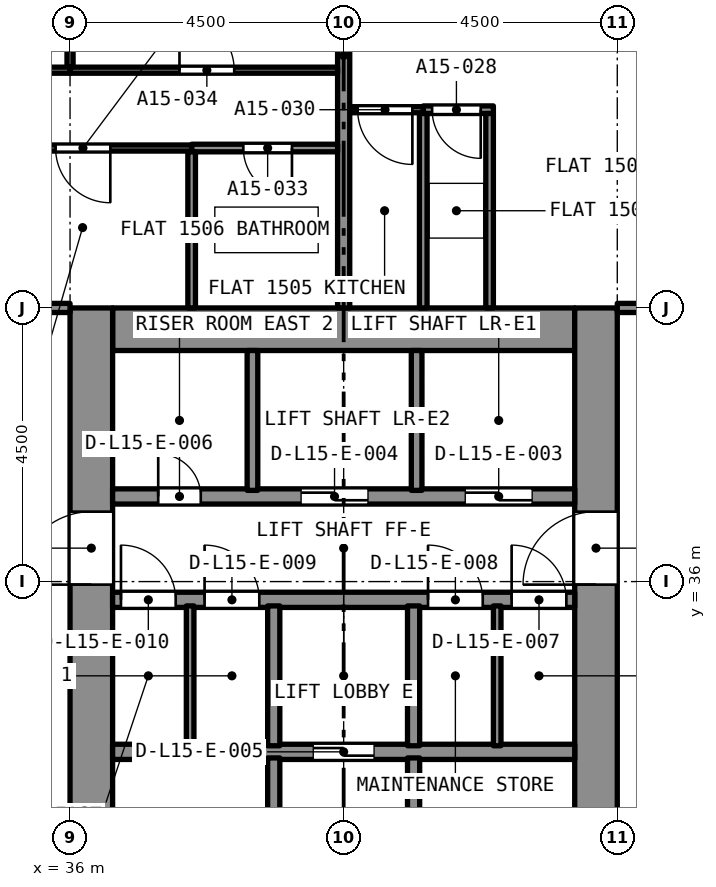
"""IFC4 building model, lengths in metres.
Left out: names, types, materials, properties, quantities, classifications, styles, units other than length and angle.
Written with IfcOpenShell. Run it as: python <this file> out.ifc"""

import sys

from ifc_helpers import new_model, si_unit, direction, frame, frame_2d, origin, place, context, subcontext, project, spatial, rectangle, extrude, element, fill, save


model = new_model("IFC4")
c1 = context("Model", 3, precision=1e-05, world=origin(), true_north=direction((0.0, 1.0)))
c2 = subcontext(c1, "Body", "Model", "MODEL_VIEW")
j1 = project(units=[si_unit("LENGTHUNIT", "METRE"), si_unit("PLANEANGLEUNIT", "RADIAN")], contexts=[c1])
p1 = place(None, origin())
s1 = spatial("IfcSite", under=j1, at=p1, CompositionType="ELEMENT")
p2 = place(p1, origin())
s2 = spatial("IfcBuilding", under=s1, at=p2, CompositionType="ELEMENT")
p3 = place(p2, frame((0.0, 0.0, 59.2)))
s3 = spatial("IfcBuildingStorey", under=s2, at=p3, CompositionType="ELEMENT", Elevation=59.2)
p4 = place(p3, frame((36.7, 40.15, 0.0), z_axis=(0.0, 0.0, 1.0), x_axis=(1.0, 0.0, 0.0)))
e1 = element("IfcWall", 1, at=p4, inside=s3, PredefinedType="SOLIDWALL", context=c2, shape_type="SweptSolid", body=[
    extrude(rectangle(XDim=7.6, YDim=0.7, at=frame_2d((3.8, 0.0))), origin(), (0.0, 0.0, 1.0), 3.2),
])
p5 = place(p3, frame((36.35, 27.0, 0.0), z_axis=(0.0, 0.0, 1.0), x_axis=(0.0, 1.0, 0.0)))
e2 = element("IfcWall", 2, at=p5, inside=s3, PredefinedType="SOLIDWALL", context=c2, shape_type="SweptSolid", body=[
    extrude(rectangle(XDim=13.5, YDim=0.7, at=frame_2d((6.75, 0.0))), origin(), (0.0, 0.0, 1.0), 3.2),
])
p6 = place(p5, frame((8.95, 0.0, 0.0)))
e3 = element("IfcOpeningElement", 3, at=p6, cuts=e2, PredefinedType="OPENING", context=c2, shape_type="SweptSolid", body=[
    extrude(rectangle(XDim=1.2, YDim=2.1, at=frame_2d((0.6, 1.05))), frame((0.0, 0.36, 0.0), z_axis=(0.0, -1.0, 0.0), x_axis=(1.0, 0.0, 0.0)), (0.0, 0.0, 1.0), 0.72),
])
p7 = place(p3, frame((44.65, 27.0, 0.0), z_axis=(0.0, 0.0, 1.0), x_axis=(0.0, 1.0, 0.0)))
e4 = element("IfcWall", 4, at=p7, inside=s3, PredefinedType="SOLIDWALL", context=c2, shape_type="SweptSolid", body=[
    extrude(rectangle(XDim=13.5, YDim=0.7, at=frame_2d((6.75, 0.0))), origin(), (0.0, 0.0, 1.0), 3.2),
])
p8 = place(p7, frame((8.95, 0.0, 0.0)))
e5 = element("IfcOpeningElement", 5, at=p8, cuts=e4, PredefinedType="OPENING", context=c2, shape_type="SweptSolid", body=[
    extrude(rectangle(XDim=1.2, YDim=2.1, at=frame_2d((0.6, 1.05))), frame((0.0, 0.36, 0.0), z_axis=(0.0, -1.0, 0.0), x_axis=(1.0, 0.0, 0.0)), (0.0, 0.0, 1.0), 0.72),
])
p9 = place(p3, frame((42.962, 43.76, 0.0), z_axis=(0.0, 0.0, 1.0), x_axis=(-1.0, 0.0, 0.0)))
e6 = element("IfcWall", 6, at=p9, inside=s3, PredefinedType="PARTITIONING", context=c2, shape_type="SweptSolid", body=[
    extrude(rectangle(XDim=1.153, YDim=0.125, at=frame_2d((0.577, 0.0))), origin(), (0.0, 0.0, 1.0), 2.9),
])
p10 = place(p9, frame((0.208, 0.0, 0.0)))
e7 = element("IfcOpeningElement", 7, at=p10, cuts=e6, PredefinedType="OPENING", context=c2, shape_type="SweptSolid", body=[
    extrude(rectangle(XDim=0.8, YDim=2.1, at=frame_2d((0.4, 1.05))), frame((0.0, 0.073, 0.0), z_axis=(0.0, -1.0, 0.0), x_axis=(1.0, 0.0, 0.0)), (0.0, 0.0, 1.0), 0.145),
])
for number, where, z_axis, x_axis in (
    (8, (42.9, 40.5, 0.0), (0.0, 0.0, 1.0), (0.0, 1.0, 0.0)),
    (9, (41.809, 40.5, 0.0), (0.0, 0.0, 1.0), (0.0, 1.0, 0.0)),
):
    element("IfcWall", number, at=place(p3, frame(where, z_axis=z_axis, x_axis=x_axis)), inside=s3, PredefinedType="PARTITIONING", context=c2, shape_type="SweptSolid", body=[
        extrude(rectangle(XDim=3.198, YDim=0.125, at=frame_2d((1.599, 0.0))), origin(), (0.0, 0.0, 1.0), 2.9),
    ])
p11 = place(p3, frame((41.809, 43.76, 0.0), z_axis=(0.0, 0.0, 1.0), x_axis=(-1.0, 0.0, 0.0)))
e10 = element("IfcWall", 10, at=p11, inside=s3, PredefinedType="PARTITIONING", context=c2, shape_type="SweptSolid", body=[
    extrude(rectangle(XDim=1.209, YDim=0.1, at=frame_2d((0.604, 0.0))), origin(), (0.0, 0.0, 1.0), 2.9),
])
p12 = place(p11, frame((0.179, 0.0, 0.0)))
e11 = element("IfcOpeningElement", 11, at=p12, cuts=e10, PredefinedType="OPENING", context=c2, shape_type="SweptSolid", body=[
    extrude(rectangle(XDim=0.9, YDim=2.1, at=frame_2d((0.45, 1.05))), frame((0.0, 0.06, 0.0), z_axis=(0.0, -1.0, 0.0), x_axis=(1.0, 0.0, 0.0)), (0.0, 0.0, 1.0), 0.12),
])
p13 = place(p3, frame((45.0, 40.5, 0.0), z_axis=(0.0, 0.0, 1.0), x_axis=(1.0, 0.0, 0.0)))
e12 = element("IfcWall", 12, at=p13, inside=s3, PredefinedType="PARTITIONING", context=c2, shape_type="SweptSolid", body=[
    extrude(rectangle(XDim=3.8, YDim=0.15, at=frame_2d((1.9, 0.0))), origin(), (0.0, 0.0, 1.0), 2.9),
])
p14 = place(p13, frame((1.75, 0.0, 0.0)))
e13 = element("IfcOpeningElement", 13, at=p14, cuts=e12, PredefinedType="OPENING", context=c2, shape_type="SweptSolid", body=[
    extrude(rectangle(XDim=1.0, YDim=2.1, at=frame_2d((0.5, 1.05))), frame((0.0, 0.085, 0.0), z_axis=(0.0, -1.0, 0.0), x_axis=(1.0, 0.0, 0.0)), (0.0, 0.0, 1.0), 0.17),
])
p15 = place(p3, frame((40.5, 40.5, 0.0), z_axis=(0.0, 0.0, 1.0), x_axis=(0.0, 1.0, 0.0)))
e14 = element("IfcWall", 14, at=p15, inside=s3, PredefinedType="PARTITIONING", context=c2, shape_type="SweptSolid", body=[
    extrude(rectangle(XDim=8.3, YDim=0.2, at=frame_2d((4.15, 0.0))), origin(), (0.0, 0.0, 1.0), 2.9),
])
p16 = place(p3, frame((40.4, 43.13, 0.0), z_axis=(0.0, 0.0, 1.0), x_axis=(-1.0, 0.0, 0.0)))
e15 = element("IfcWall", 15, at=p16, inside=s3, PredefinedType="PARTITIONING", context=c2, shape_type="SweptSolid", body=[
    extrude(rectangle(XDim=2.4, YDim=0.125, at=frame_2d((1.2, 0.0))), origin(), (0.0, 0.0, 1.0), 2.9),
])
p17 = place(p16, frame((0.75, 0.0, 0.0)))
e16 = element("IfcOpeningElement", 16, at=p17, cuts=e15, PredefinedType="OPENING", context=c2, shape_type="SweptSolid", body=[
    extrude(rectangle(XDim=0.8, YDim=2.1, at=frame_2d((0.4, 1.05))), frame((0.0, 0.073, 0.0), z_axis=(0.0, -1.0, 0.0), x_axis=(1.0, 0.0, 0.0)), (0.0, 0.0, 1.0), 0.145),
])
p18 = place(p3, frame((38.0, 40.5, 0.0), z_axis=(0.0, 0.0, 1.0), x_axis=(0.0, 1.0, 0.0)))
e17 = element("IfcWall", 17, at=p18, inside=s3, PredefinedType="PARTITIONING", context=c2, shape_type="SweptSolid", body=[
    extrude(rectangle(XDim=2.567, YDim=0.125, at=frame_2d((1.284, 0.0))), origin(), (0.0, 0.0, 1.0), 2.9),
])
p19 = place(p3, frame((36.0, 44.41, 0.0), z_axis=(0.0, 0.0, 1.0), x_axis=(1.0, 0.0, 0.0)))
e18 = element("IfcWall", 18, at=p19, inside=s3, PredefinedType="PARTITIONING", context=c2, shape_type="SweptSolid", body=[
    extrude(rectangle(XDim=4.4, YDim=0.1, at=frame_2d((2.2, 0.0))), origin(), (0.0, 0.0, 1.0), 2.9),
])
p20 = place(p19, frame((1.8, 0.0, 0.0)))
e19 = element("IfcOpeningElement", 19, at=p20, cuts=e18, PredefinedType="OPENING", context=c2, shape_type="SweptSolid", body=[
    extrude(rectangle(XDim=0.9, YDim=2.1, at=frame_2d((0.45, 1.05))), frame((0.0, 0.06, 0.0), z_axis=(0.0, -1.0, 0.0), x_axis=(1.0, 0.0, 0.0)), (0.0, 0.0, 1.0), 0.12),
])
p21 = place(p3, frame((36.0, 44.46, 0.0), z_axis=(0.0, 0.0, 1.0), x_axis=(0.0, 1.0, 0.0)))
e20 = element("IfcWall", 20, at=p21, inside=s3, PredefinedType="PARTITIONING", context=c2, shape_type="SweptSolid", body=[
    extrude(rectangle(XDim=4.34, YDim=0.1, at=frame_2d((2.17, 0.0))), origin(), (0.0, 0.0, 1.0), 2.9),
])
p22 = place(p3, frame((38.0, 43.13, 0.0), z_axis=(0.0, 0.0, 1.0), x_axis=(-1.0, 0.0, 0.0)))
e21 = element("IfcWall", 21, at=p22, inside=s3, PredefinedType="PARTITIONING", context=c2, shape_type="SweptSolid", body=[
    extrude(rectangle(XDim=3.625, YDim=0.1, at=frame_2d((1.812, 0.0))), origin(), (0.0, 0.0, 1.0), 2.9),
])
p23 = place(p22, frame((1.337, 0.0, 0.0)))
e22 = element("IfcOpeningElement", 22, at=p23, cuts=e21, PredefinedType="OPENING", context=c2, shape_type="SweptSolid", body=[
    extrude(rectangle(XDim=0.9, YDim=2.1, at=frame_2d((0.45, 1.05))), frame((0.0, 0.06, 0.0), z_axis=(0.0, -1.0, 0.0), x_axis=(1.0, 0.0, 0.0)), (0.0, 0.0, 1.0), 0.12),
])
p24 = place(p3, frame((32.2, 44.41, 0.0), z_axis=(0.0, 0.0, 1.0), x_axis=(1.0, 0.0, 0.0)))
e23 = element("IfcWall", 23, at=p24, inside=s3, PredefinedType="PARTITIONING", context=c2, shape_type="SweptSolid", body=[
    extrude(rectangle(XDim=3.8, YDim=0.1, at=frame_2d((1.9, 0.0))), origin(), (0.0, 0.0, 1.0), 2.9),
])
p25 = place(p24, frame((1.05, 0.0, 0.0)))
e24 = element("IfcOpeningElement", 24, at=p25, cuts=e23, PredefinedType="OPENING", context=c2, shape_type="SweptSolid", body=[
    extrude(rectangle(XDim=1.0, YDim=2.1, at=frame_2d((0.5, 1.05))), frame((0.0, 0.06, 0.0), z_axis=(0.0, -1.0, 0.0), x_axis=(1.0, 0.0, 0.0)), (0.0, 0.0, 1.0), 0.12),
])
p26 = place(p3, frame((34.425, 40.5, 0.0), z_axis=(0.0, 0.0, 1.0), x_axis=(1.0, 0.0, 0.0)))
e25 = element("IfcWall", 25, at=p26, inside=s3, PredefinedType="PARTITIONING", context=c2, shape_type="SweptSolid", body=[
    extrude(rectangle(XDim=1.575, YDim=0.15, at=frame_2d((0.788, 0.0))), origin(), (0.0, 0.0, 1.0), 2.9),
])
p27 = place(p3, frame((36.7, 33.2, 0.0), z_axis=(0.0, 0.0, 1.0), x_axis=(1.0, 0.0, 0.0)))
e26 = element("IfcWall", 26, at=p27, inside=s3, PredefinedType="SOLIDWALL", context=c2, shape_type="SweptSolid", body=[
    extrude(rectangle(XDim=7.6, YDim=0.25, at=frame_2d((3.8, 0.0))), origin(), (0.0, 0.0, 1.0), 2.9),
])
p28 = place(p27, frame((3.3, 0.0, 0.0)))
e27 = element("IfcOpeningElement", 27, at=p28, cuts=e26, PredefinedType="OPENING", context=c2, shape_type="SweptSolid", body=[
    extrude(rectangle(XDim=1.0, YDim=2.1, at=frame_2d((0.5, 1.05))), frame((0.0, 0.135, 0.0), z_axis=(0.0, -1.0, 0.0), x_axis=(1.0, 0.0, 0.0)), (0.0, 0.0, 1.0), 0.27),
])
p29 = place(p3, frame((36.7, 35.7, 0.0), z_axis=(0.0, 0.0, 1.0), x_axis=(1.0, 0.0, 0.0)))
e28 = element("IfcWall", 28, at=p29, inside=s3, PredefinedType="SOLIDWALL", context=c2, shape_type="SweptSolid", body=[
    extrude(rectangle(XDim=7.6, YDim=0.25, at=frame_2d((3.8, 0.0))), origin(), (0.0, 0.0, 1.0), 2.9),
])
p30 = place(p29, frame((6.562, 0.0, 0.0)))
e29 = element("IfcOpeningElement", 29, at=p30, cuts=e28, PredefinedType="OPENING", context=c2, shape_type="SweptSolid", body=[
    extrude(rectangle(XDim=0.9, YDim=2.1, at=frame_2d((0.45, 1.05))), frame((0.0, 0.135, 0.0), z_axis=(0.0, -1.0, 0.0), x_axis=(1.0, 0.0, 0.0)), (0.0, 0.0, 1.0), 0.27),
])
p31 = place(p29, frame((5.188, 0.0, 0.0)))
e30 = element("IfcOpeningElement", 30, at=p31, cuts=e28, PredefinedType="OPENING", context=c2, shape_type="SweptSolid", body=[
    extrude(rectangle(XDim=0.9, YDim=2.1, at=frame_2d((0.45, 1.05))), frame((0.0, 0.135, 0.0), z_axis=(0.0, -1.0, 0.0), x_axis=(1.0, 0.0, 0.0)), (0.0, 0.0, 1.0), 0.27),
])
p32 = place(p29, frame((1.512, 0.0, 0.0)))
e31 = element("IfcOpeningElement", 31, at=p32, cuts=e28, PredefinedType="OPENING", context=c2, shape_type="SweptSolid", body=[
    extrude(rectangle(XDim=0.9, YDim=2.1, at=frame_2d((0.45, 1.05))), frame((0.0, 0.135, 0.0), z_axis=(0.0, -1.0, 0.0), x_axis=(1.0, 0.0, 0.0)), (0.0, 0.0, 1.0), 0.27),
])
p33 = place(p29, frame((0.137, 0.0, 0.0)))
e32 = element("IfcOpeningElement", 32, at=p33, cuts=e28, PredefinedType="OPENING", context=c2, shape_type="SweptSolid", body=[
    extrude(rectangle(XDim=0.9, YDim=2.1, at=frame_2d((0.45, 1.05))), frame((0.0, 0.135, 0.0), z_axis=(0.0, -1.0, 0.0), x_axis=(1.0, 0.0, 0.0)), (0.0, 0.0, 1.0), 0.27),
])
p34 = place(p3, frame((36.7, 37.4, 0.0), z_axis=(0.0, 0.0, 1.0), x_axis=(1.0, 0.0, 0.0)))
e33 = element("IfcWall", 33, at=p34, inside=s3, PredefinedType="SOLIDWALL", context=c2, shape_type="SweptSolid", body=[
    extrude(rectangle(XDim=7.6, YDim=0.25, at=frame_2d((3.8, 0.0))), origin(), (0.0, 0.0, 1.0), 2.9),
])
p35 = place(p34, frame((5.8, 0.0, 0.0)))
e34 = element("IfcOpeningElement", 34, at=p35, cuts=e33, PredefinedType="OPENING", context=c2, shape_type="SweptSolid", body=[
    extrude(rectangle(XDim=1.1, YDim=2.4, at=frame_2d((0.55, 1.2))), frame((0.0, 0.135, 0.0), z_axis=(0.0, -1.0, 0.0), x_axis=(1.0, 0.0, 0.0)), (0.0, 0.0, 1.0), 0.27),
])
p36 = place(p34, frame((3.1, 0.0, 0.0)))
e35 = element("IfcOpeningElement", 35, at=p36, cuts=e33, PredefinedType="OPENING", context=c2, shape_type="SweptSolid", body=[
    extrude(rectangle(XDim=1.1, YDim=2.4, at=frame_2d((0.55, 1.2))), frame((0.0, 0.135, 0.0), z_axis=(0.0, -1.0, 0.0), x_axis=(1.0, 0.0, 0.0)), (0.0, 0.0, 1.0), 0.27),
])
p37 = place(p34, frame((0.75, 0.0, 0.0)))
e36 = element("IfcOpeningElement", 36, at=p37, cuts=e33, PredefinedType="OPENING", context=c2, shape_type="SweptSolid", body=[
    extrude(rectangle(XDim=0.7, YDim=2.1, at=frame_2d((0.35, 1.05))), frame((0.0, 0.135, 0.0), z_axis=(0.0, -1.0, 0.0), x_axis=(1.0, 0.0, 0.0)), (0.0, 0.0, 1.0), 0.27),
])
p38 = place(p3, frame((41.65, 27.7, 0.0), z_axis=(0.0, 0.0, 1.0), x_axis=(0.0, 1.0, 0.0)))
e37 = element("IfcWall", 37, at=p38, inside=s3, PredefinedType="SOLIDWALL", context=c2, shape_type="SweptSolid", body=[
    extrude(rectangle(XDim=5.4, YDim=0.2, at=frame_2d((2.7, 0.0))), origin(), (0.0, 0.0, 1.0), 2.9),
])
p39 = place(p38, frame((0.2, 0.0, 0.0)))
e38 = element("IfcOpeningElement", 38, at=p39, cuts=e37, PredefinedType="OPENING", context=c2, shape_type="SweptSolid", body=[
    extrude(rectangle(XDim=0.9, YDim=2.1, at=frame_2d((0.45, 1.05))), frame((0.0, 0.11, 0.0), z_axis=(0.0, -1.0, 0.0), x_axis=(1.0, 0.0, 0.0)), (0.0, 0.0, 1.0), 0.22),
])
p40 = place(p3, frame((39.35, 27.7, 0.0), z_axis=(0.0, 0.0, 1.0), x_axis=(0.0, 1.0, 0.0)))
e39 = element("IfcWall", 39, at=p40, inside=s3, PredefinedType="SOLIDWALL", context=c2, shape_type="SweptSolid", body=[
    extrude(rectangle(XDim=5.4, YDim=0.2, at=frame_2d((2.7, 0.0))), origin(), (0.0, 0.0, 1.0), 2.9),
])
p41 = place(p40, frame((0.2, 0.0, 0.0)))
e40 = element("IfcOpeningElement", 40, at=p41, cuts=e39, PredefinedType="OPENING", context=c2, shape_type="SweptSolid", body=[
    extrude(rectangle(XDim=0.9, YDim=2.1, at=frame_2d((0.45, 1.05))), frame((0.0, 0.11, 0.0), z_axis=(0.0, -1.0, 0.0), x_axis=(1.0, 0.0, 0.0)), (0.0, 0.0, 1.0), 0.22),
])
for number, where, z_axis, x_axis in (
    (41, (41.65, 33.3, 0.0), (0.0, 0.0, 1.0), (0.0, 1.0, 0.0)),
    (42, (39.35, 33.3, 0.0), (0.0, 0.0, 1.0), (0.0, 1.0, 0.0)),
):
    element("IfcWall", number, at=place(p3, frame(where, z_axis=z_axis, x_axis=x_axis)), inside=s3, PredefinedType="SOLIDWALL", context=c2, shape_type="SweptSolid", body=[
        extrude(rectangle(XDim=2.3, YDim=0.2, at=frame_2d((1.15, 0.0))), origin(), (0.0, 0.0, 1.0), 2.9),
    ])
for number, where, z_axis, x_axis in (
    (43, (41.7, 37.5, 0.0), (0.0, 0.0, 1.0), (0.0, 1.0, 0.0)),
    (44, (39.0, 37.5, 0.0), (0.0, 0.0, 1.0), (0.0, 1.0, 0.0)),
):
    element("IfcWall", number, at=place(p3, frame(where, z_axis=z_axis, x_axis=x_axis)), inside=s3, PredefinedType="SOLIDWALL", context=c2, shape_type="SweptSolid", body=[
        extrude(rectangle(XDim=2.3, YDim=0.175, at=frame_2d((1.15, 0.0))), origin(), (0.0, 0.0, 1.0), 2.9),
    ])
for number, where, z_axis, x_axis in (
    (45, (43.025, 33.3, 0.0), (0.0, 0.0, 1.0), (0.0, 1.0, 0.0)),
    (46, (37.975, 33.3, 0.0), (0.0, 0.0, 1.0), (0.0, 1.0, 0.0)),
):
    element("IfcWall", number, at=place(p3, frame(where, z_axis=z_axis, x_axis=x_axis)), inside=s3, PredefinedType="PARTITIONING", context=c2, shape_type="SweptSolid", body=[
        extrude(rectangle(XDim=2.3, YDim=0.125, at=frame_2d((1.15, 0.0))), origin(), (0.0, 0.0, 1.0), 2.9),
    ])
p42 = place(p10, origin())
e47 = element("IfcDoor", 47, at=p42, inside=s3, OperationType="SINGLE_SWING_RIGHT", PredefinedType="DOOR", context=c2, shape_type="SweptSolid", body=[
    extrude(rectangle(XDim=0.8, YDim=2.1, at=frame_2d((0.4, 1.05))), frame((0.0, 0.025, 0.0), z_axis=(0.0, -1.0, 0.0), x_axis=(1.0, 0.0, 0.0)), (0.0, 0.0, 1.0), 0.05),
])
fill(e7, e47)
p43 = place(p12, origin())
e48 = element("IfcDoor", 48, at=p43, inside=s3, OperationType="SINGLE_SWING_RIGHT", PredefinedType="DOOR", context=c2, shape_type="SweptSolid", body=[
    extrude(rectangle(XDim=0.9, YDim=2.1, at=frame_2d((0.45, 1.05))), frame((0.0, 0.025, 0.0), z_axis=(0.0, -1.0, 0.0), x_axis=(1.0, 0.0, 0.0)), (0.0, 0.0, 1.0), 0.05),
])
fill(e11, e48)
p44 = place(p17, origin())
e49 = element("IfcDoor", 49, at=p44, inside=s3, OperationType="SINGLE_SWING_LEFT", PredefinedType="DOOR", context=c2, shape_type="SweptSolid", body=[
    extrude(rectangle(XDim=0.8, YDim=2.1, at=frame_2d((0.4, 1.05))), frame((0.0, 0.025, 0.0), z_axis=(0.0, -1.0, 0.0), x_axis=(1.0, 0.0, 0.0)), (0.0, 0.0, 1.0), 0.05),
])
fill(e16, e49)
p45 = place(p20, origin())
e50 = element("IfcDoor", 50, at=p45, inside=s3, OperationType="SINGLE_SWING_RIGHT", PredefinedType="DOOR", context=c2, shape_type="SweptSolid", body=[
    extrude(rectangle(XDim=0.9, YDim=2.1, at=frame_2d((0.45, 1.05))), frame((0.0, 0.025, 0.0), z_axis=(0.0, -1.0, 0.0), x_axis=(1.0, 0.0, 0.0)), (0.0, 0.0, 1.0), 0.05),
])
fill(e19, e50)
p46 = place(p23, origin())
e51 = element("IfcDoor", 51, at=p46, inside=s3, OperationType="SINGLE_SWING_LEFT", PredefinedType="DOOR", context=c2, shape_type="SweptSolid", body=[
    extrude(rectangle(XDim=0.9, YDim=2.1, at=frame_2d((0.45, 1.05))), frame((0.0, 0.025, 0.0), z_axis=(0.0, -1.0, 0.0), x_axis=(1.0, 0.0, 0.0)), (0.0, 0.0, 1.0), 0.05),
])
fill(e22, e51)
p47 = place(p35, origin())
e52 = element("IfcDoor", 52, at=p47, inside=s3, OperationType="SLIDING_TO_LEFT", PredefinedType="DOOR", context=c2, shape_type="SweptSolid", body=[
    extrude(rectangle(XDim=1.1, YDim=2.4, at=frame_2d((0.55, 1.2))), frame((0.0, 0.025, 0.0), z_axis=(0.0, -1.0, 0.0), x_axis=(1.0, 0.0, 0.0)), (0.0, 0.0, 1.0), 0.05),
])
fill(e34, e52)
p48 = place(p36, origin())
e53 = element("IfcDoor", 53, at=p48, inside=s3, OperationType="SLIDING_TO_LEFT", PredefinedType="DOOR", context=c2, shape_type="SweptSolid", body=[
    extrude(rectangle(XDim=1.1, YDim=2.4, at=frame_2d((0.55, 1.2))), frame((0.0, 0.025, 0.0), z_axis=(0.0, -1.0, 0.0), x_axis=(1.0, 0.0, 0.0)), (0.0, 0.0, 1.0), 0.05),
])
fill(e35, e53)
p49 = place(p28, origin())
e54 = element("IfcDoor", 54, at=p49, inside=s3, OperationType="SLIDING_TO_LEFT", PredefinedType="DOOR", context=c2, shape_type="SweptSolid", body=[
    extrude(rectangle(XDim=1.0, YDim=2.1, at=frame_2d((0.5, 1.05))), frame((0.0, 0.025, 0.0), z_axis=(0.0, -1.0, 0.0), x_axis=(1.0, 0.0, 0.0)), (0.0, 0.0, 1.0), 0.05),
])
fill(e27, e54)
p50 = place(p37, origin())
e55 = element("IfcDoor", 55, at=p50, inside=s3, OperationType="SINGLE_SWING_LEFT", PredefinedType="DOOR", context=c2, shape_type="SweptSolid", body=[
    extrude(rectangle(XDim=0.7, YDim=2.1, at=frame_2d((0.35, 1.05))), frame((0.0, 0.025, 0.0), z_axis=(0.0, -1.0, 0.0), x_axis=(1.0, 0.0, 0.0)), (0.0, 0.0, 1.0), 0.05),
])
fill(e36, e55)
p51 = place(p30, origin())
e56 = element("IfcDoor", 56, at=p51, inside=s3, OperationType="SINGLE_SWING_LEFT", PredefinedType="DOOR", context=c2, shape_type="SweptSolid", body=[
    extrude(rectangle(XDim=0.9, YDim=2.1, at=frame_2d((0.45, 1.05))), frame((0.0, 0.025, 0.0), z_axis=(0.0, -1.0, 0.0), x_axis=(1.0, 0.0, 0.0)), (0.0, 0.0, 1.0), 0.05),
])
fill(e29, e56)
p52 = place(p31, origin())
e57 = element("IfcDoor", 57, at=p52, inside=s3, OperationType="SINGLE_SWING_LEFT", PredefinedType="DOOR", context=c2, shape_type="SweptSolid", body=[
    extrude(rectangle(XDim=0.9, YDim=2.1, at=frame_2d((0.45, 1.05))), frame((0.0, 0.025, 0.0), z_axis=(0.0, -1.0, 0.0), x_axis=(1.0, 0.0, 0.0)), (0.0, 0.0, 1.0), 0.05),
])
fill(e30, e57)
p53 = place(p32, origin())
e58 = element("IfcDoor", 58, at=p53, inside=s3, OperationType="SINGLE_SWING_LEFT", PredefinedType="DOOR", context=c2, shape_type="SweptSolid", body=[
    extrude(rectangle(XDim=0.9, YDim=2.1, at=frame_2d((0.45, 1.05))), frame((0.0, 0.025, 0.0), z_axis=(0.0, -1.0, 0.0), x_axis=(1.0, 0.0, 0.0)), (0.0, 0.0, 1.0), 0.05),
])
fill(e31, e58)
p54 = place(p33, origin())
e59 = element("IfcDoor", 59, at=p54, inside=s3, OperationType="SINGLE_SWING_LEFT", PredefinedType="DOOR", context=c2, shape_type="SweptSolid", body=[
    extrude(rectangle(XDim=0.9, YDim=2.1, at=frame_2d((0.45, 1.05))), frame((0.0, 0.025, 0.0), z_axis=(0.0, -1.0, 0.0), x_axis=(1.0, 0.0, 0.0)), (0.0, 0.0, 1.0), 0.05),
])
fill(e32, e59)
p55 = place(p6, origin())
e60 = element("IfcDoor", 60, at=p55, inside=s3, OperationType="SINGLE_SWING_LEFT", PredefinedType="DOOR", context=c2, shape_type="SweptSolid", body=[
    extrude(rectangle(XDim=1.2, YDim=2.1, at=frame_2d((0.6, 1.05))), frame((0.0, 0.025, 0.0), z_axis=(0.0, -1.0, 0.0), x_axis=(1.0, 0.0, 0.0)), (0.0, 0.0, 1.0), 0.05),
])
fill(e3, e60)
p56 = place(p8, origin())
e61 = element("IfcDoor", 61, at=p56, inside=s3, OperationType="SINGLE_SWING_LEFT", PredefinedType="DOOR", context=c2, shape_type="SweptSolid", body=[
    extrude(rectangle(XDim=1.2, YDim=2.1, at=frame_2d((0.6, 1.05))), frame((0.0, 0.025, 0.0), z_axis=(0.0, -1.0, 0.0), x_axis=(1.0, 0.0, 0.0)), (0.0, 0.0, 1.0), 0.05),
])
fill(e5, e61)
save(model, sys.argv[1])
